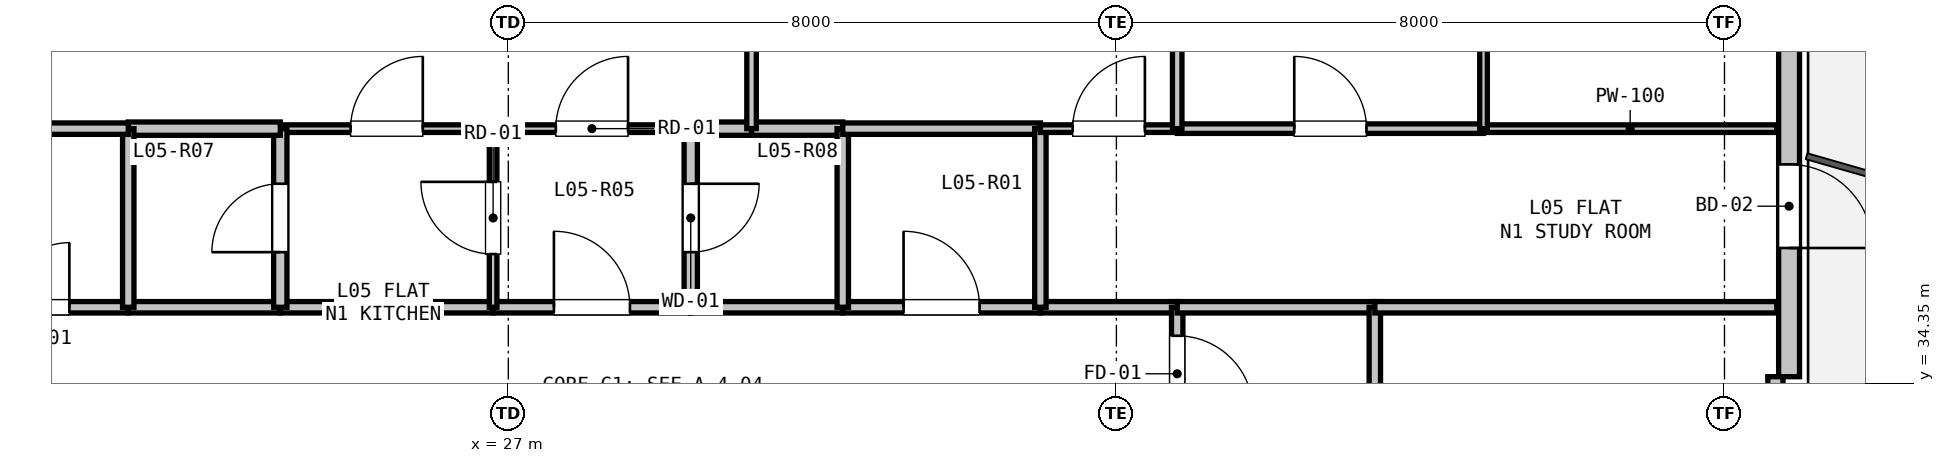
"""IFC4 building model, lengths in metres.
Left out: names, types, materials, properties, quantities, classifications, styles, units other than length and angle.
Written with IfcOpenShell. Run it as: python <this file> out.ifc"""

import sys

from ifc_helpers import new_model, si_unit, direction, frame, frame_2d, origin, place, context, subcontext, project, spatial, rectangle, extrude, element, fill, save


model = new_model("IFC4")
c1 = context("Model", 3, precision=1e-05, world=origin(), true_north=direction((0.0, 1.0)))
c2 = subcontext(c1, "Body", "Model", "MODEL_VIEW")
j1 = project(units=[si_unit("LENGTHUNIT", "METRE"), si_unit("PLANEANGLEUNIT", "RADIAN")], contexts=[c1])
p1 = place(None, origin())
s1 = spatial("IfcSite", under=j1, at=p1, CompositionType="ELEMENT")
p2 = place(p1, origin())
s2 = spatial("IfcBuilding", under=s1, at=p2, CompositionType="ELEMENT")
p3 = place(p2, frame((0.0, 0.0, 22.5)))
s3 = spatial("IfcBuildingStorey", under=s2, at=p3, CompositionType="ELEMENT", Elevation=22.5)
p4 = place(p3, frame((16.39, 36.617, 0.0), z_axis=(0.0, 0.0, 1.0), x_axis=(0.866027351828, 0.499996625875, 0.0)))
e1 = element("IfcWall", 1, at=p4, inside=s3, PredefinedType="PARAPET", context=c2, shape_type="SweptSolid", body=[
    extrude(rectangle(XDim=11.973, YDim=0.2, at=frame_2d((5.987, 0.0))), origin(), (0.0, 0.0, 1.0), 0.2),
])
p5 = place(p3, frame((43.85, 47.11, 0.0), z_axis=(0.0, 0.0, 1.0), x_axis=(0.0, -1.0, 0.0)))
e2 = element("IfcWall", 2, at=p5, inside=s3, PredefinedType="SOLIDWALL", context=c2, shape_type="SweptSolid", body=[
    extrude(rectangle(XDim=12.673, YDim=0.275, at=frame_2d((6.336, 0.0))), origin(), (0.0, 0.0, 1.0), 2.66),
])
p6 = place(p5, frame((9.88, 0.0, 0.0)))
e3 = element("IfcOpeningElement", 3, at=p6, cuts=e2, PredefinedType="OPENING", context=c2, shape_type="SweptSolid", body=[
    extrude(rectangle(XDim=1.1, YDim=2.1, at=frame_2d((0.55, 1.05))), frame((0.0, 0.147, 0.0), z_axis=(0.0, -1.0, 0.0), x_axis=(1.0, 0.0, 0.0)), (0.0, 0.0, 1.0), 0.295),
])
p7 = place(p3, frame((43.67, 34.437, 0.0), z_axis=(0.0, 0.0, 1.0), x_axis=(0.0, -1.0, 0.0)))
e4 = element("IfcWall", 4, at=p7, inside=s3, PredefinedType="PARAPET", context=c2, shape_type="SweptSolid", body=[
    extrude(rectangle(XDim=1.7, YDim=0.2, at=frame_2d((0.85, 0.0))), origin(), (0.0, 0.0, 1.0), 2.66),
])
p8 = place(p3, frame((19.6, 35.35, 0.0), z_axis=(0.0, 0.0, 1.0), x_axis=(1.0, 0.0, 0.0)))
e5 = element("IfcWall", 5, at=p8, inside=s3, PredefinedType="PARTITIONING", context=c2, shape_type="SweptSolid", body=[
    extrude(rectangle(XDim=2.4, YDim=0.15, at=frame_2d((1.2, 0.0))), origin(), (0.0, 0.0, 1.0), 3.04),
])
p9 = place(p8, frame((0.775, 0.0, 0.0)))
e6 = element("IfcOpeningElement", 6, at=p9, cuts=e5, PredefinedType="OPENING", context=c2, shape_type="SweptSolid", body=[
    extrude(rectangle(XDim=0.85, YDim=2.1, at=frame_2d((0.425, 1.05))), frame((0.0, 0.085, 0.0), z_axis=(0.0, -1.0, 0.0), x_axis=(1.0, 0.0, 0.0)), (0.0, 0.0, 1.0), 0.17),
])
p10 = place(p3, frame((22.0, 35.35, 0.0), z_axis=(0.0, 0.0, 1.0), x_axis=(1.0, 0.0, 0.0)))
e7 = element("IfcWall", 7, at=p10, inside=s3, PredefinedType="PARTITIONING", context=c2, shape_type="SweptSolid", body=[
    extrude(rectangle(XDim=2.0, YDim=0.15, at=frame_2d((1.0, 0.0))), origin(), (0.0, 0.0, 1.0), 3.04),
])
p11 = place(p3, frame((24.0, 35.35, 0.0), z_axis=(0.0, 0.0, 1.0), x_axis=(1.0, 0.0, 0.0)))
e8 = element("IfcWall", 8, at=p11, inside=s3, PredefinedType="PARTITIONING", context=c2, shape_type="SweptSolid", body=[
    extrude(rectangle(XDim=2.8, YDim=0.15, at=frame_2d((1.4, 0.0))), origin(), (0.0, 0.0, 1.0), 3.04),
])
p12 = place(p3, frame((26.8, 35.35, 0.0), z_axis=(0.0, 0.0, 1.0), x_axis=(1.0, 0.0, 0.0)))
e9 = element("IfcWall", 9, at=p12, inside=s3, PredefinedType="PARTITIONING", context=c2, shape_type="SweptSolid", body=[
    extrude(rectangle(XDim=2.6, YDim=0.15, at=frame_2d((1.3, 0.0))), origin(), (0.0, 0.0, 1.0), 3.04),
])
p13 = place(p12, frame((0.8, 0.0, 0.0)))
e10 = element("IfcOpeningElement", 10, at=p13, cuts=e9, PredefinedType="OPENING", context=c2, shape_type="SweptSolid", body=[
    extrude(rectangle(XDim=1.0, YDim=2.15, at=frame_2d((0.5, 1.075))), frame((0.0, 0.085, 0.0), z_axis=(0.0, -1.0, 0.0), x_axis=(1.0, 0.0, 0.0)), (0.0, 0.0, 1.0), 0.17),
])
p14 = place(p3, frame((29.4, 35.35, 0.0), z_axis=(0.0, 0.0, 1.0), x_axis=(1.0, 0.0, 0.0)))
e11 = element("IfcWall", 11, at=p14, inside=s3, PredefinedType="PARTITIONING", context=c2, shape_type="SweptSolid", body=[
    extrude(rectangle(XDim=2.0, YDim=0.15, at=frame_2d((1.0, 0.0))), origin(), (0.0, 0.0, 1.0), 3.04),
])
p15 = place(p3, frame((31.4, 35.35, 0.0), z_axis=(0.0, 0.0, 1.0), x_axis=(1.0, 0.0, 0.0)))
e12 = element("IfcWall", 12, at=p15, inside=s3, PredefinedType="PARTITIONING", context=c2, shape_type="SweptSolid", body=[
    extrude(rectangle(XDim=2.6, YDim=0.15, at=frame_2d((1.3, 0.0))), origin(), (0.0, 0.0, 1.0), 3.04),
])
p16 = place(p15, frame((0.8, 0.0, 0.0)))
e13 = element("IfcOpeningElement", 13, at=p16, cuts=e12, PredefinedType="OPENING", context=c2, shape_type="SweptSolid", body=[
    extrude(rectangle(XDim=1.0, YDim=2.15, at=frame_2d((0.5, 1.075))), frame((0.0, 0.085, 0.0), z_axis=(0.0, -1.0, 0.0), x_axis=(1.0, 0.0, 0.0)), (0.0, 0.0, 1.0), 0.17),
])
p17 = place(p3, frame((34.0, 35.35, 0.0), z_axis=(0.0, 0.0, 1.0), x_axis=(1.0, 0.0, 0.0)))
e14 = element("IfcWall", 14, at=p17, inside=s3, PredefinedType="PARTITIONING", context=c2, shape_type="SweptSolid", body=[
    extrude(rectangle(XDim=1.8, YDim=0.15, at=frame_2d((0.9, 0.0))), origin(), (0.0, 0.0, 1.0), 3.04),
])
p18 = place(p3, frame((35.8, 35.35, 0.0), z_axis=(0.0, 0.0, 1.0), x_axis=(0.0, -1.0, 0.0)))
e15 = element("IfcWall", 15, at=p18, inside=s3, PredefinedType="PARTITIONING", context=c2, shape_type="SweptSolid", body=[
    extrude(rectangle(XDim=1.75, YDim=0.15, at=frame_2d((0.875, 0.0))), origin(), (0.0, 0.0, 1.0), 3.04),
])
p19 = place(p18, frame((0.375, 0.0, 0.0)))
e16 = element("IfcOpeningElement", 16, at=p19, cuts=e15, PredefinedType="OPENING", context=c2, shape_type="SweptSolid", body=[
    extrude(rectangle(XDim=1.0, YDim=2.15, at=frame_2d((0.5, 1.075))), frame((0.0, 0.085, 0.0), z_axis=(0.0, -1.0, 0.0), x_axis=(1.0, 0.0, 0.0)), (0.0, 0.0, 1.0), 0.17),
])
p20 = place(p3, frame((35.8, 35.35, 0.0), z_axis=(0.0, 0.0, 1.0), x_axis=(1.0, 0.0, 0.0)))
e17 = element("IfcWall", 17, at=p20, inside=s3, PredefinedType="PARTITIONING", context=c2, shape_type="SweptSolid", body=[
    extrude(rectangle(XDim=2.6, YDim=0.15, at=frame_2d((1.3, 0.0))), origin(), (0.0, 0.0, 1.0), 2.337),
])
p21 = place(p3, frame((38.4, 35.35, 0.0), z_axis=(0.0, 0.0, 1.0), x_axis=(0.0, -1.0, 0.0)))
e18 = element("IfcWall", 18, at=p21, inside=s3, PredefinedType="PARTITIONING", context=c2, shape_type="SweptSolid", body=[
    extrude(rectangle(XDim=5.35, YDim=0.15, at=frame_2d((2.675, 0.0))), origin(), (0.0, 0.0, 1.0), 2.337),
])
p22 = place(p3, frame((26.8, 37.7, 0.0), z_axis=(0.0, 0.0, 1.0), x_axis=(1.0, 0.0, 0.0)))
e19 = element("IfcWall", 19, at=p22, inside=s3, PredefinedType="PARTITIONING", context=c2, shape_type="SweptSolid", body=[
    extrude(rectangle(XDim=2.6, YDim=0.1, at=frame_2d((1.3, 0.0))), origin(), (0.0, 0.0, 1.0), 3.04),
])
p23 = place(p22, frame((0.825, 0.0, 0.0)))
e20 = element("IfcOpeningElement", 20, at=p23, cuts=e19, PredefinedType="OPENING", context=c2, shape_type="SweptSolid", body=[
    extrude(rectangle(XDim=0.95, YDim=2.1, at=frame_2d((0.475, 1.05))), frame((0.0, 0.06, 0.0), z_axis=(0.0, -1.0, 0.0), x_axis=(1.0, 0.0, 0.0)), (0.0, 0.0, 1.0), 0.12),
])
p24 = place(p3, frame((29.4, 37.7, 0.0), z_axis=(0.0, 0.0, 1.0), x_axis=(0.0, -1.0, 0.0)))
e21 = element("IfcWall", 21, at=p24, inside=s3, PredefinedType="PLUMBINGWALL", context=c2, shape_type="SweptSolid", body=[
    extrude(rectangle(XDim=2.35, YDim=0.175, at=frame_2d((1.175, 0.0))), origin(), (0.0, 0.0, 1.0), 3.04),
])
p25 = place(p24, frame((0.725, 0.0, 0.0)))
e22 = element("IfcOpeningElement", 22, at=p25, cuts=e21, PredefinedType="OPENING", context=c2, shape_type="SweptSolid", body=[
    extrude(rectangle(XDim=0.9, YDim=2.1, at=frame_2d((0.45, 1.05))), frame((0.0, 0.097, 0.0), z_axis=(0.0, -1.0, 0.0), x_axis=(1.0, 0.0, 0.0)), (0.0, 0.0, 1.0), 0.195),
])
p26 = place(p3, frame((26.8, 35.35, 0.0), z_axis=(0.0, 0.0, 1.0), x_axis=(0.0, 1.0, 0.0)))
e23 = element("IfcWall", 23, at=p26, inside=s3, PredefinedType="PARTITIONING", context=c2, shape_type="SweptSolid", body=[
    extrude(rectangle(XDim=2.35, YDim=0.1, at=frame_2d((1.175, 0.0))), origin(), (0.0, 0.0, 1.0), 3.04),
])
p27 = place(p26, frame((0.7, 0.0, 0.0)))
e24 = element("IfcOpeningElement", 24, at=p27, cuts=e23, PredefinedType="OPENING", context=c2, shape_type="SweptSolid", body=[
    extrude(rectangle(XDim=0.95, YDim=2.1, at=frame_2d((0.475, 1.05))), frame((0.0, 0.06, 0.0), z_axis=(0.0, -1.0, 0.0), x_axis=(1.0, 0.0, 0.0)), (0.0, 0.0, 1.0), 0.12),
])
p28 = place(p3, frame((24.0, 37.7, 0.0), z_axis=(0.0, 0.0, 1.0), x_axis=(1.0, 0.0, 0.0)))
e25 = element("IfcWall", 25, at=p28, inside=s3, PredefinedType="PARTITIONING", context=c2, shape_type="SweptSolid", body=[
    extrude(rectangle(XDim=2.8, YDim=0.1, at=frame_2d((1.4, 0.0))), origin(), (0.0, 0.0, 1.0), 3.04),
])
p29 = place(p28, frame((0.925, 0.0, 0.0)))
e26 = element("IfcOpeningElement", 26, at=p29, cuts=e25, PredefinedType="OPENING", context=c2, shape_type="SweptSolid", body=[
    extrude(rectangle(XDim=0.95, YDim=2.1, at=frame_2d((0.475, 1.05))), frame((0.0, 0.06, 0.0), z_axis=(0.0, -1.0, 0.0), x_axis=(1.0, 0.0, 0.0)), (0.0, 0.0, 1.0), 0.12),
])
p30 = place(p3, frame((24.0, 35.35, 0.0), z_axis=(0.0, 0.0, 1.0), x_axis=(0.0, 1.0, 0.0)))
e27 = element("IfcWall", 27, at=p30, inside=s3, PredefinedType="PLUMBINGWALL", context=c2, shape_type="SweptSolid", body=[
    extrude(rectangle(XDim=2.35, YDim=0.175, at=frame_2d((1.175, 0.0))), origin(), (0.0, 0.0, 1.0), 3.04),
])
p31 = place(p30, frame((0.725, 0.0, 0.0)))
e28 = element("IfcOpeningElement", 28, at=p31, cuts=e27, PredefinedType="OPENING", context=c2, shape_type="SweptSolid", body=[
    extrude(rectangle(XDim=0.9, YDim=2.1, at=frame_2d((0.45, 1.05))), frame((0.0, 0.097, 0.0), z_axis=(0.0, -1.0, 0.0), x_axis=(1.0, 0.0, 0.0)), (0.0, 0.0, 1.0), 0.195),
])
p32 = place(p3, frame((22.0, 37.7, 0.0), z_axis=(0.0, 0.0, 1.0), x_axis=(1.0, 0.0, 0.0)))
e29 = element("IfcWall", 29, at=p32, inside=s3, PredefinedType="PLUMBINGWALL", context=c2, shape_type="SweptSolid", body=[
    extrude(rectangle(XDim=2.0, YDim=0.175, at=frame_2d((1.0, 0.0))), origin(), (0.0, 0.0, 1.0), 3.04),
])
p33 = place(p3, frame((22.0, 35.35, 0.0), z_axis=(0.0, 0.0, 1.0), x_axis=(0.0, 1.0, 0.0)))
e30 = element("IfcWall", 30, at=p33, inside=s3, PredefinedType="PARTITIONING", context=c2, shape_type="SweptSolid", body=[
    extrude(rectangle(XDim=2.35, YDim=0.15, at=frame_2d((1.175, 0.0))), origin(), (0.0, 0.0, 1.0), 3.04),
])
p34 = place(p3, frame((29.4, 37.7, 0.0), z_axis=(0.0, 0.0, 1.0), x_axis=(1.0, 0.0, 0.0)))
e31 = element("IfcWall", 31, at=p34, inside=s3, PredefinedType="PLUMBINGWALL", context=c2, shape_type="SweptSolid", body=[
    extrude(rectangle(XDim=0.8, YDim=0.175, at=frame_2d((0.4, 0.0))), origin(), (0.0, 0.0, 1.0), 3.04),
])
p35 = place(p3, frame((30.2, 37.7, 0.0), z_axis=(0.0, 0.0, 1.0), x_axis=(1.0, 0.0, 0.0)))
e32 = element("IfcWall", 32, at=p35, inside=s3, PredefinedType="PLUMBINGWALL", context=c2, shape_type="SweptSolid", body=[
    extrude(rectangle(XDim=1.2, YDim=0.175, at=frame_2d((0.6, 0.0))), origin(), (0.0, 0.0, 1.0), 3.04),
])
p36 = place(p3, frame((31.4, 37.7, 0.0), z_axis=(0.0, 0.0, 1.0), x_axis=(0.0, -1.0, 0.0)))
e33 = element("IfcWall", 33, at=p36, inside=s3, PredefinedType="PARTITIONING", context=c2, shape_type="SweptSolid", body=[
    extrude(rectangle(XDim=2.35, YDim=0.15, at=frame_2d((1.175, 0.0))), origin(), (0.0, 0.0, 1.0), 3.04),
])
p37 = place(p3, frame((31.4, 37.7, 0.0), z_axis=(0.0, 0.0, 1.0), x_axis=(1.0, 0.0, 0.0)))
e34 = element("IfcWall", 34, at=p37, inside=s3, PredefinedType="PARTITIONING", context=c2, shape_type="SweptSolid", body=[
    extrude(rectangle(XDim=2.6, YDim=0.15, at=frame_2d((1.3, 0.0))), origin(), (0.0, 0.0, 1.0), 3.04),
])
p38 = place(p3, frame((34.0, 37.7, 0.0), z_axis=(0.0, 0.0, 1.0), x_axis=(0.0, -1.0, 0.0)))
e35 = element("IfcWall", 35, at=p38, inside=s3, PredefinedType="PARTITIONING", context=c2, shape_type="SweptSolid", body=[
    extrude(rectangle(XDim=2.35, YDim=0.15, at=frame_2d((1.175, 0.0))), origin(), (0.0, 0.0, 1.0), 3.04),
])
p39 = place(p3, frame((18.331, 37.7, 0.0), z_axis=(0.0, 0.0, 1.0), x_axis=(1.0, 0.0, 0.0)))
e36 = element("IfcWall", 36, at=p39, inside=s3, PredefinedType="PARTITIONING", context=c2, shape_type="SweptSolid", body=[
    extrude(rectangle(XDim=3.669, YDim=0.15, at=frame_2d((1.834, 0.0))), origin(), (0.0, 0.0, 1.0), 2.365),
])
p40 = place(p3, frame((43.688, 35.35, 0.0), z_axis=(0.0, 0.0, 1.0), x_axis=(-1.0, 0.0, 0.0)))
e37 = element("IfcWall", 37, at=p40, inside=s3, PredefinedType="PARTITIONING", context=c2, shape_type="SweptSolid", body=[
    extrude(rectangle(XDim=5.289, YDim=0.15, at=frame_2d((2.644, 0.0))), origin(), (0.0, 0.0, 1.0), 2.337),
])
p41 = place(p3, frame((34.0, 37.7, 0.0), z_axis=(0.0, 0.0, 1.0), x_axis=(1.0, 0.0, 0.0)))
e38 = element("IfcWall", 38, at=p41, inside=s3, PredefinedType="PARTITIONING", context=c2, shape_type="SweptSolid", body=[
    extrude(rectangle(XDim=1.8, YDim=0.1, at=frame_2d((0.9, 0.0))), origin(), (0.0, 0.0, 1.0), 3.04),
])
p42 = place(p41, frame((0.425, 0.0, 0.0)))
e39 = element("IfcOpeningElement", 39, at=p42, cuts=e38, PredefinedType="OPENING", context=c2, shape_type="SweptSolid", body=[
    extrude(rectangle(XDim=0.95, YDim=2.1, at=frame_2d((0.475, 1.05))), frame((0.0, 0.06, 0.0), z_axis=(0.0, -1.0, 0.0), x_axis=(1.0, 0.0, 0.0)), (0.0, 0.0, 1.0), 0.12),
])
p43 = place(p3, frame((35.8, 37.7, 0.0), z_axis=(0.0, 0.0, 1.0), x_axis=(1.0, 0.0, 0.0)))
e40 = element("IfcWall", 40, at=p43, inside=s3, PredefinedType="PARTITIONING", context=c2, shape_type="SweptSolid", body=[
    extrude(rectangle(XDim=4.03, YDim=0.125, at=frame_2d((2.015, 0.0))), origin(), (0.0, 0.0, 1.0), 2.337),
])
p44 = place(p43, frame((1.54, 0.0, 0.0)))
e41 = element("IfcOpeningElement", 41, at=p44, cuts=e40, PredefinedType="OPENING", context=c2, shape_type="SweptSolid", body=[
    extrude(rectangle(XDim=0.95, YDim=2.1, at=frame_2d((0.475, 1.05))), frame((0.0, 0.073, 0.0), z_axis=(0.0, -1.0, 0.0), x_axis=(1.0, 0.0, 0.0)), (0.0, 0.0, 1.0), 0.145),
])
p45 = place(p3, frame((39.83, 37.7, 0.0), z_axis=(0.0, 0.0, 1.0), x_axis=(1.0, 0.0, 0.0)))
e42 = element("IfcWall", 42, at=p45, inside=s3, PredefinedType="PARTITIONING", context=c2, shape_type="SweptSolid", body=[
    extrude(rectangle(XDim=3.858, YDim=0.1, at=frame_2d((1.929, 0.0))), origin(), (0.0, 0.0, 1.0), 2.337),
])
p46 = place(p3, frame((30.2, 44.404, 0.0), z_axis=(0.0, 0.0, 1.0), x_axis=(0.0, -1.0, 0.0)))
e43 = element("IfcWall", 43, at=p46, inside=s3, PredefinedType="PARTITIONING", context=c2, shape_type="SweptSolid", body=[
    extrude(rectangle(XDim=6.704, YDim=0.125, at=frame_2d((3.352, 0.0))), origin(), (0.0, 0.0, 1.0), 2.365),
])
p47 = place(p46, frame((2.877, 0.0, 0.0)))
e44 = element("IfcOpeningElement", 44, at=p47, cuts=e43, PredefinedType="OPENING", context=c2, shape_type="SweptSolid", body=[
    extrude(rectangle(XDim=0.95, YDim=2.1, at=frame_2d((0.475, 1.05))), frame((0.0, 0.073, 0.0), z_axis=(0.0, -1.0, 0.0), x_axis=(1.0, 0.0, 0.0)), (0.0, 0.0, 1.0), 0.145),
])
p48 = place(p3, frame((35.8, 43.78, 0.0), z_axis=(0.0, 0.0, 1.0), x_axis=(0.0, -1.0, 0.0)))
e45 = element("IfcWall", 45, at=p48, inside=s3, PredefinedType="PARTITIONING", context=c2, shape_type="SweptSolid", body=[
    extrude(rectangle(XDim=6.08, YDim=0.125, at=frame_2d((3.04, 0.0))), origin(), (0.0, 0.0, 1.0), 3.04),
])
p49 = place(p3, frame((39.83, 43.78, 0.0), z_axis=(0.0, 0.0, 1.0), x_axis=(0.0, -1.0, 0.0)))
e46 = element("IfcWall", 46, at=p49, inside=s3, PredefinedType="PARTITIONING", context=c2, shape_type="SweptSolid", body=[
    extrude(rectangle(XDim=6.08, YDim=0.1, at=frame_2d((3.04, 0.0))), origin(), (0.0, 0.0, 1.0), 3.04),
])
p50 = place(p49, frame((2.565, 0.0, 0.0)))
e47 = element("IfcOpeningElement", 47, at=p50, cuts=e46, PredefinedType="OPENING", context=c2, shape_type="SweptSolid", body=[
    extrude(rectangle(XDim=0.95, YDim=2.1, at=frame_2d((0.475, 1.05))), frame((0.0, 0.06, 0.0), z_axis=(0.0, -1.0, 0.0), x_axis=(1.0, 0.0, 0.0)), (0.0, 0.0, 1.0), 0.12),
])
p51 = place(p6, origin())
e48 = element("IfcDoor", 48, at=p51, inside=s3, OperationType="SINGLE_SWING_RIGHT", PredefinedType="DOOR", context=c2, shape_type="SweptSolid", body=[
    extrude(rectangle(XDim=1.1, YDim=2.1, at=frame_2d((0.55, 1.05))), frame((0.0, 0.025, 0.0), z_axis=(0.0, -1.0, 0.0), x_axis=(1.0, 0.0, 0.0)), (0.0, 0.0, 1.0), 0.05),
])
fill(e3, e48)
p52 = place(p19, origin())
e49 = element("IfcDoor", 49, at=p52, inside=s3, OperationType="SINGLE_SWING_RIGHT", PredefinedType="DOOR", context=c2, shape_type="SweptSolid", body=[
    extrude(rectangle(XDim=1.0, YDim=2.15, at=frame_2d((0.5, 1.075))), frame((0.0, 0.025, 0.0), z_axis=(0.0, -1.0, 0.0), x_axis=(1.0, 0.0, 0.0)), (0.0, 0.0, 1.0), 0.05),
])
fill(e16, e49)
p53 = place(p13, origin())
e50 = element("IfcDoor", 50, at=p53, inside=s3, OperationType="SINGLE_SWING_LEFT", PredefinedType="DOOR", context=c2, shape_type="SweptSolid", body=[
    extrude(rectangle(XDim=1.0, YDim=2.15, at=frame_2d((0.5, 1.075))), frame((0.0, 0.025, 0.0), z_axis=(0.0, -1.0, 0.0), x_axis=(1.0, 0.0, 0.0)), (0.0, 0.0, 1.0), 0.05),
])
fill(e10, e50)
p54 = place(p16, origin())
e51 = element("IfcDoor", 51, at=p54, inside=s3, OperationType="SINGLE_SWING_LEFT", PredefinedType="DOOR", context=c2, shape_type="SweptSolid", body=[
    extrude(rectangle(XDim=1.0, YDim=2.15, at=frame_2d((0.5, 1.075))), frame((0.0, 0.025, 0.0), z_axis=(0.0, -1.0, 0.0), x_axis=(1.0, 0.0, 0.0)), (0.0, 0.0, 1.0), 0.05),
])
fill(e13, e51)
p55 = place(p9, origin())
e52 = element("IfcDoor", 52, at=p55, inside=s3, OperationType="SINGLE_SWING_RIGHT", PredefinedType="DOOR", context=c2, shape_type="SweptSolid", body=[
    extrude(rectangle(XDim=0.85, YDim=2.1, at=frame_2d((0.425, 1.05))), frame((0.0, 0.025, 0.0), z_axis=(0.0, -1.0, 0.0), x_axis=(1.0, 0.0, 0.0)), (0.0, 0.0, 1.0), 0.05),
])
fill(e6, e52)
p56 = place(p27, origin())
e53 = element("IfcDoor", 53, at=p56, inside=s3, OperationType="SINGLE_SWING_RIGHT", PredefinedType="DOOR", context=c2, shape_type="SweptSolid", body=[
    extrude(rectangle(XDim=0.95, YDim=2.1, at=frame_2d((0.475, 1.05))), frame((0.0, 0.025, 0.0), z_axis=(0.0, -1.0, 0.0), x_axis=(1.0, 0.0, 0.0)), (0.0, 0.0, 1.0), 0.05),
])
fill(e24, e53)
p57 = place(p25, origin())
e54 = element("IfcDoor", 54, at=p57, inside=s3, OperationType="SINGLE_SWING_LEFT", PredefinedType="DOOR", context=c2, shape_type="SweptSolid", body=[
    extrude(rectangle(XDim=0.9, YDim=2.1, at=frame_2d((0.45, 1.05))), frame((0.0, 0.025, 0.0), z_axis=(0.0, -1.0, 0.0), x_axis=(1.0, 0.0, 0.0)), (0.0, 0.0, 1.0), 0.05),
])
fill(e22, e54)
p58 = place(p23, origin())
e55 = element("IfcDoor", 55, at=p58, inside=s3, OperationType="SINGLE_SWING_RIGHT", PredefinedType="DOOR", context=c2, shape_type="SweptSolid", body=[
    extrude(rectangle(XDim=0.95, YDim=2.1, at=frame_2d((0.475, 1.05))), frame((0.0, 0.025, 0.0), z_axis=(0.0, -1.0, 0.0), x_axis=(1.0, 0.0, 0.0)), (0.0, 0.0, 1.0), 0.05),
])
fill(e20, e55)
p59 = place(p29, origin())
e56 = element("IfcDoor", 56, at=p59, inside=s3, OperationType="SINGLE_SWING_RIGHT", PredefinedType="DOOR", context=c2, shape_type="SweptSolid", body=[
    extrude(rectangle(XDim=0.95, YDim=2.1, at=frame_2d((0.475, 1.05))), frame((0.0, 0.025, 0.0), z_axis=(0.0, -1.0, 0.0), x_axis=(1.0, 0.0, 0.0)), (0.0, 0.0, 1.0), 0.05),
])
fill(e26, e56)
p60 = place(p42, origin())
e57 = element("IfcDoor", 57, at=p60, inside=s3, OperationType="SINGLE_SWING_RIGHT", PredefinedType="DOOR", context=c2, shape_type="SweptSolid", body=[
    extrude(rectangle(XDim=0.95, YDim=2.1, at=frame_2d((0.475, 1.05))), frame((0.0, 0.025, 0.0), z_axis=(0.0, -1.0, 0.0), x_axis=(1.0, 0.0, 0.0)), (0.0, 0.0, 1.0), 0.05),
])
fill(e39, e57)
p61 = place(p44, origin())
e58 = element("IfcDoor", 58, at=p61, inside=s3, OperationType="SINGLE_SWING_LEFT", PredefinedType="DOOR", context=c2, shape_type="SweptSolid", body=[
    extrude(rectangle(XDim=0.95, YDim=2.1, at=frame_2d((0.475, 1.05))), frame((0.0, 0.025, 0.0), z_axis=(0.0, -1.0, 0.0), x_axis=(1.0, 0.0, 0.0)), (0.0, 0.0, 1.0), 0.05),
])
fill(e41, e58)
p62 = place(p31, origin())
e59 = element("IfcDoor", 59, at=p62, inside=s3, OperationType="SINGLE_SWING_LEFT", PredefinedType="DOOR", context=c2, shape_type="SweptSolid", body=[
    extrude(rectangle(XDim=0.9, YDim=2.1, at=frame_2d((0.45, 1.05))), frame((0.0, 0.025, 0.0), z_axis=(0.0, -1.0, 0.0), x_axis=(1.0, 0.0, 0.0)), (0.0, 0.0, 1.0), 0.05),
])
fill(e28, e59)
save(model, sys.argv[1])
